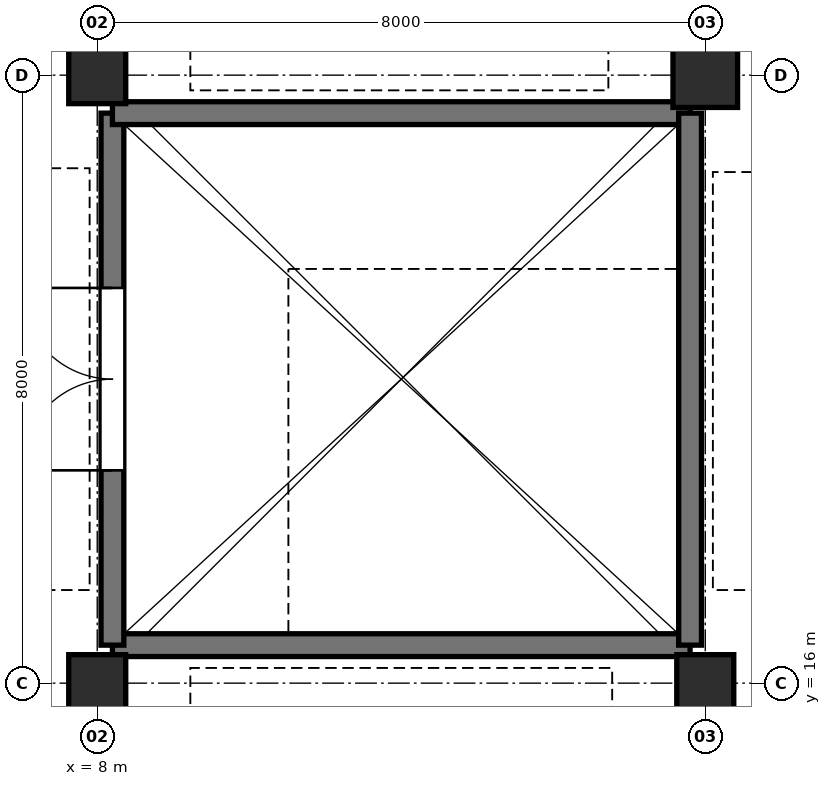
"""IFC4 building model, lengths in metres.
Left out: names, types, materials, properties, quantities, classifications, styles, units other than length and angle.
Written with IfcOpenShell. Run it as: python <this file> out.ifc"""

import sys

from ifc_helpers import new_model, si_unit, direction, frame, frame_2d, origin, origin_2d, place, context, subcontext, project, spatial, rectangle, extrude, element, fill, save


model = new_model("IFC4")
c1 = context("Model", 3, precision=1e-05, world=origin(), true_north=direction((0.0, 1.0)))
c2 = subcontext(c1, "Body", "Model", "MODEL_VIEW")
j1 = project(units=[si_unit("LENGTHUNIT", "METRE"), si_unit("PLANEANGLEUNIT", "RADIAN")], contexts=[c1])
p1 = place(None, origin())
s1 = spatial("IfcSite", under=j1, at=p1, CompositionType="ELEMENT")
p2 = place(p1, origin())
s2 = spatial("IfcBuilding", under=s1, at=p2, CompositionType="ELEMENT")
p3 = place(p2, frame((0.0, 0.0, 5.4)))
s3 = spatial("IfcBuildingStorey", under=s2, at=p3, CompositionType="ELEMENT", Elevation=5.4)
for number, where, z_axis, x_axis in (
    (1, (8.0, 16.0, 0.0), (0.0, 0.0, 1.0), (1.0, 0.0, 0.0)),
    (2, (8.0, 24.0, 0.0), (0.0, 0.0, 1.0), (1.0, 0.0, 0.0)),
    (3, (16.0, 16.0, 0.0), (0.0, 0.0, 1.0), (1.0, 0.0, 0.0)),
):
    element("IfcColumn", number, at=place(p3, frame(where, z_axis=z_axis, x_axis=x_axis)), inside=s3, PredefinedType="COLUMN", context=c2, shape_type="SweptSolid", body=[
        extrude(rectangle(XDim=0.75, YDim=0.75, at=origin_2d()), origin(), (0.0, 0.0, 1.0), 4.8),
    ])
p4 = place(p3, frame((16.0, 24.0, 0.0), z_axis=(0.0, 0.0, 1.0), x_axis=(1.0, 0.0, 0.0)))
e4 = element("IfcColumn", 4, at=p4, inside=s3, PredefinedType="COLUMN", context=c2, shape_type="SweptSolid", body=[
    extrude(rectangle(XDim=0.85, YDim=0.85, at=origin_2d()), origin(), (0.0, 0.0, 1.0), 4.8),
])
p5 = place(p3, frame((15.8, 16.5, 0.0), z_axis=(0.0, 0.0, 1.0), x_axis=(-1.0, 0.0, 0.0)))
e5 = element("IfcWall", 5, at=p5, inside=s3, PredefinedType="SHEAR", context=c2, shape_type="SweptSolid", body=[
    extrude(rectangle(XDim=7.6, YDim=0.3, at=frame_2d((3.8, 0.0))), origin(), (0.0, 0.0, 1.0), 4.48),
])
p6 = place(p3, frame((8.2, 16.5, 0.0), z_axis=(0.0, 0.0, 1.0), x_axis=(0.0, 1.0, 0.0)))
e6 = element("IfcWall", 6, at=p6, inside=s3, PredefinedType="SHEAR", context=c2, shape_type="SweptSolid", body=[
    extrude(rectangle(XDim=7.0, YDim=0.3, at=frame_2d((3.5, 0.0))), origin(), (0.0, 0.0, 1.0), 4.48),
])
p7 = place(p6, frame((2.3, 0.0, 0.0)))
e7 = element("IfcOpeningElement", 7, at=p7, cuts=e6, PredefinedType="OPENING", context=c2, shape_type="SweptSolid", body=[
    extrude(rectangle(XDim=2.4, YDim=2.2, at=frame_2d((1.2, 1.1))), frame((0.0, 0.16, 0.0), z_axis=(0.0, -1.0, 0.0), x_axis=(1.0, 0.0, 0.0)), (0.0, 0.0, 1.0), 0.32),
])
p8 = place(p3, frame((8.2, 23.5, 0.0), z_axis=(0.0, 0.0, 1.0), x_axis=(1.0, 0.0, 0.0)))
e8 = element("IfcWall", 8, at=p8, inside=s3, PredefinedType="SHEAR", context=c2, shape_type="SweptSolid", body=[
    extrude(rectangle(XDim=7.6, YDim=0.3, at=frame_2d((3.8, 0.0))), origin(), (0.0, 0.0, 1.0), 4.48),
])
p9 = place(p3, frame((15.8, 23.5, 0.0), z_axis=(0.0, 0.0, 1.0), x_axis=(0.0, -1.0, 0.0)))
e9 = element("IfcWall", 9, at=p9, inside=s3, PredefinedType="SHEAR", context=c2, shape_type="SweptSolid", body=[
    extrude(rectangle(XDim=7.0, YDim=0.3, at=frame_2d((3.5, 0.0))), origin(), (0.0, 0.0, 1.0), 4.48),
])
p10 = place(p7, frame((2.4, 0.0, 0.0), z_axis=(0.0, 0.0, 1.0), x_axis=(-1.0, 0.0, 0.0)))
e10 = element("IfcDoor", 10, at=p10, inside=s3, OperationType="DOUBLE_DOOR_SINGLE_SWING", PredefinedType="DOOR", context=c2, shape_type="SweptSolid", body=[
    extrude(rectangle(XDim=2.4, YDim=2.2, at=frame_2d((1.2, 1.1))), frame((0.0, 0.025, 0.0), z_axis=(0.0, -1.0, 0.0), x_axis=(1.0, 0.0, 0.0)), (0.0, 0.0, 1.0), 0.05),
])
fill(e7, e10)
save(model, sys.argv[1])
